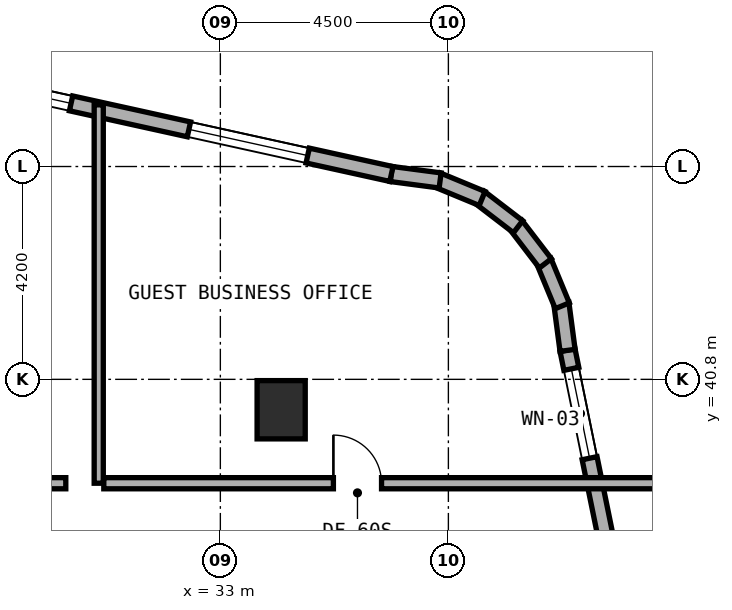
"""IFC4 building model, lengths in metres.
Left out: names, types, materials, properties, quantities, classifications, styles, units other than length and angle.
Written with IfcOpenShell. Run it as: python <this file> out.ifc"""

import sys

from ifc_helpers import new_model, si_unit, direction, frame, frame_2d, origin, origin_2d, place, context, subcontext, project, spatial, rectangle, extrude, element, fill, save


model = new_model("IFC4")
c1 = context("Model", 3, precision=1e-05, world=origin(), true_north=direction((0.0, 1.0)))
c2 = subcontext(c1, "Body", "Model", "MODEL_VIEW")
j1 = project(units=[si_unit("LENGTHUNIT", "METRE"), si_unit("PLANEANGLEUNIT", "RADIAN")], contexts=[c1])
p1 = place(None, origin())
s1 = spatial("IfcSite", under=j1, at=p1, CompositionType="ELEMENT")
p2 = place(p1, origin())
s2 = spatial("IfcBuilding", under=s1, at=p2, CompositionType="ELEMENT")
p3 = place(p2, frame((0.0, 0.0, 73.0)))
s3 = spatial("IfcBuildingStorey", under=s2, at=p3, CompositionType="ELEMENT", Elevation=73.0)
p4 = place(p3, frame((34.2, 40.2, 0.0), z_axis=(0.0, 0.0, 1.0), x_axis=(1.0, 0.0, 0.0)))
e1 = element("IfcColumn", 1, at=p4, inside=s3, PredefinedType="COLUMN", context=c2, shape_type="SweptSolid", body=[
    extrude(rectangle(XDim=0.95, YDim=1.15, at=origin_2d()), origin(), (0.0, 0.0, 1.0), 3.5),
])
p5 = place(p3, frame((41.864, 31.516, 0.0), z_axis=(0.0, 0.0, 1.0), x_axis=(-0.199990901713, 0.979797754249, 0.0)))
e2 = element("IfcWall", 2, at=p5, inside=s3, PredefinedType="STANDARD", context=c2, shape_type="SweptSolid", body=[
    extrude(rectangle(XDim=10.065, YDim=0.3, at=frame_2d((5.033, 0.0))), origin(), (0.0, 0.0, 1.0), 3.22),
])
p6 = place(p5, frame((2.429, 0.0, 0.8)))
e3 = element("IfcOpeningElement", 3, at=p6, cuts=e2, PredefinedType="OPENING", context=c2, shape_type="SweptSolid", body=[
    extrude(rectangle(XDim=2.4, YDim=1.6, at=frame_2d((1.2, 0.8))), frame((0.0, 0.16, 0.0), z_axis=(0.0, -1.0, 0.0), x_axis=(1.0, 0.0, 0.0)), (0.0, 0.0, 1.0), 0.32),
])
p7 = place(p5, frame((7.887, 0.0, 0.85)))
e4 = element("IfcOpeningElement", 4, at=p7, cuts=e2, PredefinedType="OPENING", context=c2, shape_type="SweptSolid", body=[
    extrude(rectangle(XDim=1.8, YDim=1.5, at=frame_2d((0.9, 0.75))), frame((0.0, 0.16, 0.0), z_axis=(0.0, -1.0, 0.0), x_axis=(1.0, 0.0, 0.0)), (0.0, 0.0, 1.0), 0.32),
])
p8 = place(p3, frame((39.852, 41.372, 0.0), z_axis=(0.0, 0.0, 1.0), x_axis=(-0.131174864804, 0.991359246108, 0.0)))
e5 = element("IfcWall", 5, at=p8, inside=s3, PredefinedType="STANDARD", context=c2, shape_type="SweptSolid", body=[
    extrude(rectangle(XDim=0.938, YDim=0.3, at=frame_2d((0.469, 0.0))), origin(), (0.0, 0.0, 1.0), 3.22),
])
p9 = place(p3, frame((39.748, 42.252, 0.0), z_axis=(0.0, 0.0, 1.0), x_axis=(-0.382344263057, 0.924019948111, 0.0)))
e6 = element("IfcWall", 6, at=p9, inside=s3, PredefinedType="STANDARD", context=c2, shape_type="SweptSolid", body=[
    extrude(rectangle(XDim=0.955, YDim=0.3, at=frame_2d((0.477, 0.0))), origin(), (0.0, 0.0, 1.0), 3.22),
])
p10 = place(p3, frame((39.414, 43.089, 0.0), z_axis=(0.0, 0.0, 1.0), x_axis=(-0.608474481025, 0.793573440799, 0.0)))
e7 = element("IfcWall", 7, at=p10, inside=s3, PredefinedType="STANDARD", context=c2, shape_type="SweptSolid", body=[
    extrude(rectangle(XDim=0.955, YDim=0.3, at=frame_2d((0.478, 0.0))), origin(), (0.0, 0.0, 1.0), 3.22),
])
p11 = place(p3, frame((38.875, 43.812, 0.0), z_axis=(0.0, 0.0, 1.0), x_axis=(-0.793668068435, 0.608351047625, 0.0)))
e8 = element("IfcWall", 8, at=p11, inside=s3, PredefinedType="STANDARD", context=c2, shape_type="SweptSolid", body=[
    extrude(rectangle(XDim=0.955, YDim=0.3, at=frame_2d((0.478, 0.0))), origin(), (0.0, 0.0, 1.0), 3.22),
])
p12 = place(p3, frame((38.166, 44.369, 0.0), z_axis=(0.0, 0.0, 1.0), x_axis=(-0.924019948111, 0.382344263057, 0.0)))
e9 = element("IfcWall", 9, at=p12, inside=s3, PredefinedType="STANDARD", context=c2, shape_type="SweptSolid", body=[
    extrude(rectangle(XDim=0.955, YDim=0.3, at=frame_2d((0.477, 0.0))), origin(), (0.0, 0.0, 1.0), 3.22),
])
p13 = place(p3, frame((37.337, 44.725, 0.0), z_axis=(0.0, 0.0, 1.0), x_axis=(-0.991454295543, 0.130454512571, 0.0)))
e10 = element("IfcWall", 10, at=p13, inside=s3, PredefinedType="STANDARD", context=c2, shape_type="SweptSolid", body=[
    extrude(rectangle(XDim=0.973, YDim=0.3, at=frame_2d((0.487, 0.0))), origin(), (0.0, 0.0, 1.0), 3.22),
])
p14 = place(p3, frame((36.376, 44.852, 0.0), z_axis=(0.0, 0.0, 1.0), x_axis=(-0.97654500432, 0.215313386808, 0.0)))
e11 = element("IfcWall", 11, at=p14, inside=s3, PredefinedType="STANDARD", context=c2, shape_type="SweptSolid", body=[
    extrude(rectangle(XDim=9.354, YDim=0.3, at=frame_2d((4.677, 0.0))), origin(), (0.0, 0.0, 1.0), 3.22),
])
p15 = place(p14, frame((1.692, 0.0, 0.8)))
e12 = element("IfcOpeningElement", 12, at=p15, cuts=e11, PredefinedType="OPENING", context=c2, shape_type="SweptSolid", body=[
    extrude(rectangle(XDim=2.4, YDim=1.6, at=frame_2d((1.2, 0.8))), frame((0.0, 0.16, 0.0), z_axis=(0.0, -1.0, 0.0), x_axis=(1.0, 0.0, 0.0)), (0.0, 0.0, 1.0), 0.32),
])
p16 = place(p14, frame((6.474, 0.0, 0.8)))
e13 = element("IfcOpeningElement", 13, at=p16, cuts=e11, PredefinedType="OPENING", context=c2, shape_type="SweptSolid", body=[
    extrude(rectangle(XDim=2.4, YDim=1.6, at=frame_2d((1.2, 0.8))), frame((0.0, 0.16, 0.0), z_axis=(0.0, -1.0, 0.0), x_axis=(1.0, 0.0, 0.0)), (0.0, 0.0, 1.0), 0.32),
])
p17 = place(p3, frame((27.05, 38.75, 0.0), z_axis=(0.0, 0.0, 1.0), x_axis=(1.0, 0.0, 0.0)))
e14 = element("IfcWall", 14, at=p17, inside=s3, PredefinedType="SOLIDWALL", context=c2, shape_type="SweptSolid", body=[
    extrude(rectangle(XDim=2.9, YDim=0.22, at=frame_2d((1.45, 0.0))), origin(), (0.0, 0.0, 1.0), 2.955),
])
p18 = place(p17, frame((0.8, 0.0, 0.0)))
e15 = element("IfcOpeningElement", 15, at=p18, cuts=e14, PredefinedType="OPENING", context=c2, shape_type="SweptSolid", body=[
    extrude(rectangle(XDim=1.1, YDim=2.1, at=frame_2d((0.55, 1.05))), frame((0.0, 0.12, 0.0), z_axis=(0.0, -1.0, 0.0), x_axis=(1.0, 0.0, 0.0)), (0.0, 0.0, 1.0), 0.24),
])
p19 = place(p3, frame((30.6, 38.75, 0.0), z_axis=(0.0, 0.0, 1.0), x_axis=(0.0, 1.0, 0.0)))
e16 = element("IfcWall", 16, at=p19, inside=s3, PredefinedType="SOLIDWALL", context=c2, shape_type="SweptSolid", body=[
    extrude(rectangle(XDim=7.467, YDim=0.18, at=frame_2d((3.733, 0.0))), origin(), (0.0, 0.0, 1.0), 2.745),
])
p20 = place(p3, frame((30.7, 38.75, 0.0), z_axis=(0.0, 0.0, 1.0), x_axis=(1.0, 0.0, 0.0)))
e17 = element("IfcWall", 17, at=p20, inside=s3, PredefinedType="SOLIDWALL", context=c2, shape_type="SweptSolid", body=[
    extrude(rectangle(XDim=11.04, YDim=0.22, at=frame_2d((5.52, 0.0))), origin(), (0.0, 0.0, 1.0), 2.495),
])
p21 = place(p20, frame((4.531, 0.0, 0.0)))
e18 = element("IfcOpeningElement", 18, at=p21, cuts=e17, PredefinedType="OPENING", context=c2, shape_type="SweptSolid", body=[
    extrude(rectangle(XDim=0.95, YDim=2.1, at=frame_2d((0.475, 1.05))), frame((0.0, 0.12, 0.0), z_axis=(0.0, -1.0, 0.0), x_axis=(1.0, 0.0, 0.0)), (0.0, 0.0, 1.0), 0.24),
])
p22 = place(p7, origin())
e19 = element("IfcWindow", 19, at=p22, inside=s3, PartitioningType="SINGLE_PANEL", PredefinedType="WINDOW", context=c2, shape_type="SweptSolid", body=[
    extrude(rectangle(XDim=1.8, YDim=1.5, at=frame_2d((0.9, 0.75))), frame((0.0, 0.03, 0.0), z_axis=(0.0, -1.0, 0.0), x_axis=(1.0, 0.0, 0.0)), (0.0, 0.0, 1.0), 0.06),
])
fill(e4, e19)
p23 = place(p15, origin())
e20 = element("IfcWindow", 20, at=p23, inside=s3, PartitioningType="SINGLE_PANEL", PredefinedType="WINDOW", context=c2, shape_type="SweptSolid", body=[
    extrude(rectangle(XDim=2.4, YDim=1.6, at=frame_2d((1.2, 0.8))), frame((0.0, 0.03, 0.0), z_axis=(0.0, -1.0, 0.0), x_axis=(1.0, 0.0, 0.0)), (0.0, 0.0, 1.0), 0.06),
])
fill(e12, e20)
p24 = place(p16, origin())
e21 = element("IfcWindow", 21, at=p24, inside=s3, PartitioningType="SINGLE_PANEL", PredefinedType="WINDOW", context=c2, shape_type="SweptSolid", body=[
    extrude(rectangle(XDim=2.4, YDim=1.6, at=frame_2d((1.2, 0.8))), frame((0.0, 0.03, 0.0), z_axis=(0.0, -1.0, 0.0), x_axis=(1.0, 0.0, 0.0)), (0.0, 0.0, 1.0), 0.06),
])
fill(e13, e21)
p25 = place(p21, origin())
e22 = element("IfcDoor", 22, at=p25, inside=s3, OperationType="SINGLE_SWING_LEFT", PredefinedType="DOOR", context=c2, shape_type="SweptSolid", body=[
    extrude(rectangle(XDim=0.95, YDim=2.1, at=frame_2d((0.475, 1.05))), frame((0.0, 0.025, 0.0), z_axis=(0.0, -1.0, 0.0), x_axis=(1.0, 0.0, 0.0)), (0.0, 0.0, 1.0), 0.05),
])
fill(e18, e22)
save(model, sys.argv[1])
